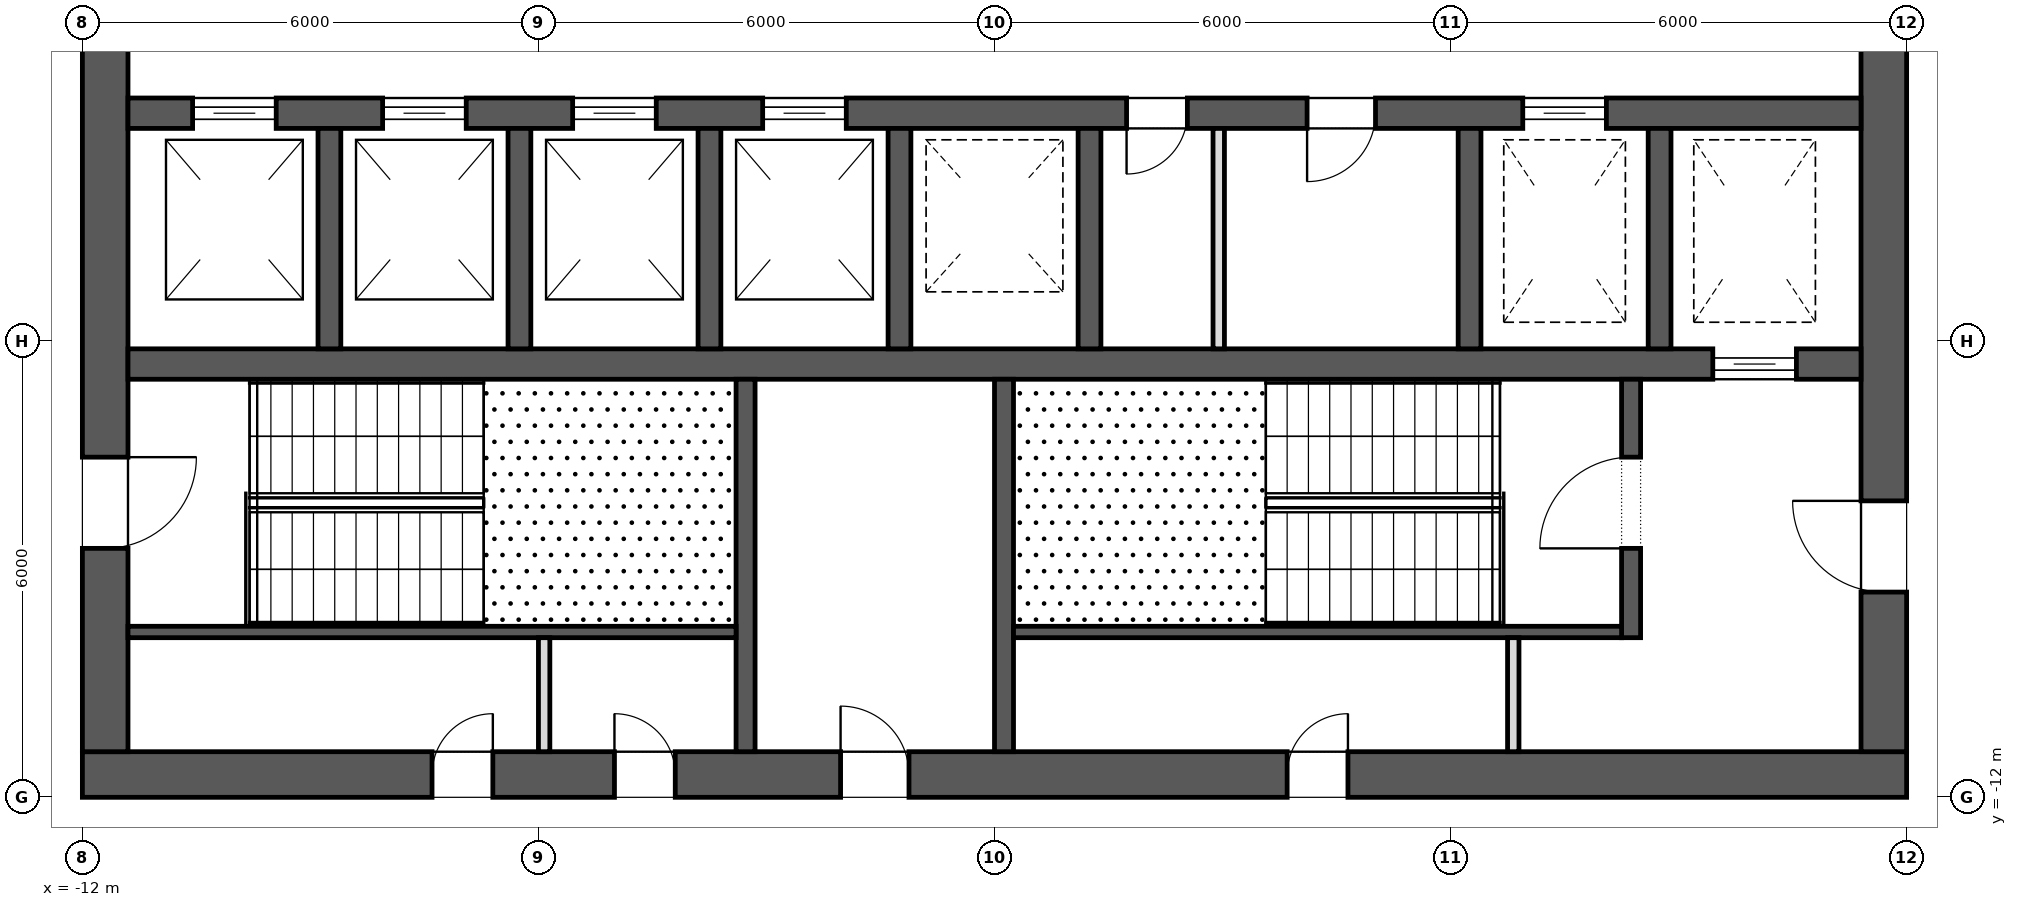
"""IFC4 building model, lengths in metres.
Left out: names, types, materials, properties, quantities, classifications, styles, units other than length and angle.
Written with IfcOpenShell. Run it as: python <this file> out.ifc"""

import sys

from ifc_helpers import new_model, si_unit, direction, frame, frame_2d, origin, place, context, subcontext, project, spatial, rectangle, extrude, element, fill, save


model = new_model("IFC4")
c1 = context("Model", 3, precision=1e-05, world=origin(), true_north=direction((0.0, 1.0)))
c2 = subcontext(c1, "Body", "Model", "MODEL_VIEW")
j1 = project(units=[si_unit("LENGTHUNIT", "METRE"), si_unit("PLANEANGLEUNIT", "RADIAN")], contexts=[c1])
p1 = place(None, origin())
s1 = spatial("IfcSite", under=j1, at=p1, CompositionType="ELEMENT")
p2 = place(p1, origin())
s2 = spatial("IfcBuilding", under=s1, at=p2, CompositionType="ELEMENT")
p3 = place(p2, frame((0.0, 0.0, 238.9)))
s3 = spatial("IfcBuildingStorey", under=s2, at=p3, CompositionType="ELEMENT", Elevation=238.9)
p4 = place(p3, frame((-12.0, -11.7, 0.0), z_axis=(0.0, 0.0, 1.0), x_axis=(1.0, 0.0, 0.0)))
e1 = element("IfcWall", 1, at=p4, inside=s3, PredefinedType="SHEAR", context=c2, shape_type="SweptSolid", body=[
    extrude(rectangle(XDim=24.0, YDim=0.6, at=frame_2d((12.0, 0.0))), origin(), (0.0, 0.0, 1.0), 4.0),
])
p5 = place(p4, frame((9.975, 0.0, 0.0)))
e2 = element("IfcOpeningElement", 2, at=p5, cuts=e1, PredefinedType="OPENING", context=c2, shape_type="SweptSolid", body=[
    extrude(rectangle(XDim=0.9, YDim=2.1, at=frame_2d((0.45, 1.05))), frame((0.0, 0.312, 0.0), z_axis=(0.0, -1.0, 0.0), x_axis=(1.0, 0.0, 0.0)), (0.0, 0.0, 1.0), 0.624),
])
p6 = place(p4, frame((4.6, 0.0, 0.0)))
e3 = element("IfcOpeningElement", 3, at=p6, cuts=e1, PredefinedType="OPENING", context=c2, shape_type="SweptSolid", body=[
    extrude(rectangle(XDim=0.8, YDim=2.1, at=frame_2d((0.4, 1.05))), frame((0.0, 0.312, 0.0), z_axis=(0.0, -1.0, 0.0), x_axis=(1.0, 0.0, 0.0)), (0.0, 0.0, 1.0), 0.624),
])
p7 = place(p4, frame((7.0, 0.0, 0.0)))
e4 = element("IfcOpeningElement", 4, at=p7, cuts=e1, PredefinedType="OPENING", context=c2, shape_type="SweptSolid", body=[
    extrude(rectangle(XDim=0.8, YDim=2.1, at=frame_2d((0.4, 1.05))), frame((0.0, 0.312, 0.0), z_axis=(0.0, -1.0, 0.0), x_axis=(1.0, 0.0, 0.0)), (0.0, 0.0, 1.0), 0.624),
])
p8 = place(p4, frame((15.85, 0.0, 0.0)))
e5 = element("IfcOpeningElement", 5, at=p8, cuts=e1, PredefinedType="OPENING", context=c2, shape_type="SweptSolid", body=[
    extrude(rectangle(XDim=0.8, YDim=2.1, at=frame_2d((0.4, 1.05))), frame((0.0, 0.312, 0.0), z_axis=(0.0, -1.0, 0.0), x_axis=(1.0, 0.0, 0.0)), (0.0, 0.0, 1.0), 0.624),
])
p9 = place(p3, frame((11.7, -11.4, 0.0), z_axis=(0.0, 0.0, 1.0), x_axis=(0.0, 1.0, 0.0)))
e6 = element("IfcWall", 6, at=p9, inside=s3, PredefinedType="SHEAR", context=c2, shape_type="SweptSolid", body=[
    extrude(rectangle(XDim=22.8, YDim=0.6, at=frame_2d((11.4, 0.0))), origin(), (0.0, 0.0, 1.0), 4.0),
])
p10 = place(p9, frame((10.2, 0.0, 0.0)))
e7 = element("IfcOpeningElement", 7, at=p10, cuts=e6, PredefinedType="OPENING", context=c2, shape_type="SweptSolid", body=[
    extrude(rectangle(XDim=2.4, YDim=2.1, at=frame_2d((1.2, 1.05))), frame((0.0, 0.312, 0.0), z_axis=(0.0, -1.0, 0.0), x_axis=(1.0, 0.0, 0.0)), (0.0, 0.0, 1.0), 0.624),
])
p11 = place(p9, frame((19.5, 0.0, 0.0)))
e8 = element("IfcOpeningElement", 8, at=p11, cuts=e6, PredefinedType="OPENING", context=c2, shape_type="SweptSolid", body=[
    extrude(rectangle(XDim=1.2, YDim=2.1, at=frame_2d((0.6, 1.05))), frame((0.0, 0.312, 0.0), z_axis=(0.0, -1.0, 0.0), x_axis=(1.0, 0.0, 0.0)), (0.0, 0.0, 1.0), 0.624),
])
p12 = place(p9, frame((2.1, 0.0, 0.0)))
e9 = element("IfcOpeningElement", 9, at=p12, cuts=e6, PredefinedType="OPENING", context=c2, shape_type="SweptSolid", body=[
    extrude(rectangle(XDim=1.2, YDim=2.1, at=frame_2d((0.6, 1.05))), frame((0.0, 0.312, 0.0), z_axis=(0.0, -1.0, 0.0), x_axis=(1.0, 0.0, 0.0)), (0.0, 0.0, 1.0), 0.624),
])
p13 = place(p3, frame((-11.7, -11.4, 0.0), z_axis=(0.0, 0.0, 1.0), x_axis=(0.0, 1.0, 0.0)))
e10 = element("IfcWall", 10, at=p13, inside=s3, PredefinedType="SHEAR", context=c2, shape_type="SweptSolid", body=[
    extrude(rectangle(XDim=22.8, YDim=0.6, at=frame_2d((11.4, 0.0))), origin(), (0.0, 0.0, 1.0), 4.0),
])
p14 = place(p13, frame((10.2, 0.0, 0.0)))
e11 = element("IfcOpeningElement", 11, at=p14, cuts=e10, PredefinedType="OPENING", context=c2, shape_type="SweptSolid", body=[
    extrude(rectangle(XDim=2.4, YDim=2.1, at=frame_2d((1.2, 1.05))), frame((0.0, 0.312, 0.0), z_axis=(0.0, -1.0, 0.0), x_axis=(1.0, 0.0, 0.0)), (0.0, 0.0, 1.0), 0.624),
])
p15 = place(p13, frame((18.925, 0.0, 0.0)))
e12 = element("IfcOpeningElement", 12, at=p15, cuts=e10, PredefinedType="OPENING", context=c2, shape_type="SweptSolid", body=[
    extrude(rectangle(XDim=1.2, YDim=2.1, at=frame_2d((0.6, 1.05))), frame((0.0, 0.312, 0.0), z_axis=(0.0, -1.0, 0.0), x_axis=(1.0, 0.0, 0.0)), (0.0, 0.0, 1.0), 0.624),
])
p16 = place(p13, frame((2.675, 0.0, 0.0)))
e13 = element("IfcOpeningElement", 13, at=p16, cuts=e10, PredefinedType="OPENING", context=c2, shape_type="SweptSolid", body=[
    extrude(rectangle(XDim=1.2, YDim=2.1, at=frame_2d((0.6, 1.05))), frame((0.0, 0.312, 0.0), z_axis=(0.0, -1.0, 0.0), x_axis=(1.0, 0.0, 0.0)), (0.0, 0.0, 1.0), 0.624),
])
p17 = place(p3, frame((-11.4, -3.0, 0.0), z_axis=(0.0, 0.0, 1.0), x_axis=(1.0, 0.0, 0.0)))
e14 = element("IfcWall", 14, at=p17, inside=s3, PredefinedType="SHEAR", context=c2, shape_type="SweptSolid", body=[
    extrude(rectangle(XDim=22.8, YDim=0.4, at=frame_2d((11.4, 0.0))), origin(), (0.0, 0.0, 1.0), 4.0),
])
p18 = place(p17, frame((0.85, 0.0, 0.0)))
e15 = element("IfcOpeningElement", 15, at=p18, cuts=e14, PredefinedType="OPENING", context=c2, shape_type="SweptSolid", body=[
    extrude(rectangle(XDim=1.1, YDim=2.1, at=frame_2d((0.55, 1.05))), frame((0.0, 0.212, 0.0), z_axis=(0.0, -1.0, 0.0), x_axis=(1.0, 0.0, 0.0)), (0.0, 0.0, 1.0), 0.424),
])
p19 = place(p17, frame((3.35, 0.0, 0.0)))
e16 = element("IfcOpeningElement", 16, at=p19, cuts=e14, PredefinedType="OPENING", context=c2, shape_type="SweptSolid", body=[
    extrude(rectangle(XDim=1.1, YDim=2.1, at=frame_2d((0.55, 1.05))), frame((0.0, 0.212, 0.0), z_axis=(0.0, -1.0, 0.0), x_axis=(1.0, 0.0, 0.0)), (0.0, 0.0, 1.0), 0.424),
])
p20 = place(p17, frame((5.85, 0.0, 0.0)))
e17 = element("IfcOpeningElement", 17, at=p20, cuts=e14, PredefinedType="OPENING", context=c2, shape_type="SweptSolid", body=[
    extrude(rectangle(XDim=1.1, YDim=2.1, at=frame_2d((0.55, 1.05))), frame((0.0, 0.212, 0.0), z_axis=(0.0, -1.0, 0.0), x_axis=(1.0, 0.0, 0.0)), (0.0, 0.0, 1.0), 0.424),
])
p21 = place(p17, frame((8.35, 0.0, 0.0)))
e18 = element("IfcOpeningElement", 18, at=p21, cuts=e14, PredefinedType="OPENING", context=c2, shape_type="SweptSolid", body=[
    extrude(rectangle(XDim=1.1, YDim=2.1, at=frame_2d((0.55, 1.05))), frame((0.0, 0.212, 0.0), z_axis=(0.0, -1.0, 0.0), x_axis=(1.0, 0.0, 0.0)), (0.0, 0.0, 1.0), 0.424),
])
p22 = place(p17, frame((18.35, 0.0, 0.0)))
e19 = element("IfcOpeningElement", 19, at=p22, cuts=e14, PredefinedType="OPENING", context=c2, shape_type="SweptSolid", body=[
    extrude(rectangle(XDim=1.1, YDim=2.1, at=frame_2d((0.55, 1.05))), frame((0.0, 0.212, 0.0), z_axis=(0.0, -1.0, 0.0), x_axis=(1.0, 0.0, 0.0)), (0.0, 0.0, 1.0), 0.424),
])
p23 = place(p17, frame((13.137, 0.0, 0.0)))
e20 = element("IfcOpeningElement", 20, at=p23, cuts=e14, PredefinedType="OPENING", context=c2, shape_type="SweptSolid", body=[
    extrude(rectangle(XDim=0.8, YDim=2.1, at=frame_2d((0.4, 1.05))), frame((0.0, 0.212, 0.0), z_axis=(0.0, -1.0, 0.0), x_axis=(1.0, 0.0, 0.0)), (0.0, 0.0, 1.0), 0.424),
])
p24 = place(p17, frame((15.512, 0.0, 0.0)))
e21 = element("IfcOpeningElement", 21, at=p24, cuts=e14, PredefinedType="OPENING", context=c2, shape_type="SweptSolid", body=[
    extrude(rectangle(XDim=0.9, YDim=2.1, at=frame_2d((0.45, 1.05))), frame((0.0, 0.212, 0.0), z_axis=(0.0, -1.0, 0.0), x_axis=(1.0, 0.0, 0.0)), (0.0, 0.0, 1.0), 0.424),
])
p25 = place(p3, frame((-11.4, -6.3, 0.0), z_axis=(0.0, 0.0, 1.0), x_axis=(1.0, 0.0, 0.0)))
e22 = element("IfcWall", 22, at=p25, inside=s3, PredefinedType="SHEAR", context=c2, shape_type="SweptSolid", body=[
    extrude(rectangle(XDim=22.8, YDim=0.4, at=frame_2d((11.4, 0.0))), origin(), (0.0, 0.0, 1.0), 4.0),
])
p26 = place(p25, frame((20.85, 0.0, 0.0)))
e23 = element("IfcOpeningElement", 23, at=p26, cuts=e22, PredefinedType="OPENING", context=c2, shape_type="SweptSolid", body=[
    extrude(rectangle(XDim=1.1, YDim=2.1, at=frame_2d((0.55, 1.05))), frame((0.0, 0.212, 0.0), z_axis=(0.0, -1.0, 0.0), x_axis=(1.0, 0.0, 0.0)), (0.0, 0.0, 1.0), 0.424),
])
for number, where, z_axis, x_axis in (
    (24, (-8.75, -6.1, 0.0), (0.0, 0.0, 1.0), (0.0, 1.0, 0.0)),
    (25, (-6.25, -6.1, 0.0), (0.0, 0.0, 1.0), (0.0, 1.0, 0.0)),
    (26, (-3.75, -6.1, 0.0), (0.0, 0.0, 1.0), (0.0, 1.0, 0.0)),
    (27, (-1.25, -6.1, 0.0), (0.0, 0.0, 1.0), (0.0, 1.0, 0.0)),
    (28, (1.25, -6.1, 0.0), (0.0, 0.0, 1.0), (0.0, 1.0, 0.0)),
    (29, (6.25, -6.1, 0.0), (0.0, 0.0, 1.0), (0.0, 1.0, 0.0)),
    (30, (8.75, -6.1, 0.0), (0.0, 0.0, 1.0), (0.0, 1.0, 0.0)),
):
    element("IfcWall", number, at=place(p3, frame(where, z_axis=z_axis, x_axis=x_axis)), inside=s3, PredefinedType="SHEAR", context=c2, shape_type="SweptSolid", body=[
        extrude(rectangle(XDim=2.9, YDim=0.3, at=frame_2d((1.45, 0.0))), origin(), (0.0, 0.0, 1.0), 4.0),
    ])
for number, where, z_axis, x_axis in (
    (31, (-3.275, -11.4, 0.0), (0.0, 0.0, 1.0), (0.0, 1.0, 0.0)),
    (32, (0.125, -11.4, 0.0), (0.0, 0.0, 1.0), (0.0, 1.0, 0.0)),
):
    element("IfcWall", number, at=place(p3, frame(where, z_axis=z_axis, x_axis=x_axis)), inside=s3, PredefinedType="SHEAR", context=c2, shape_type="SweptSolid", body=[
        extrude(rectangle(XDim=4.9, YDim=0.25, at=frame_2d((2.45, 0.0))), origin(), (0.0, 0.0, 1.0), 3.7),
    ])
p27 = place(p3, frame((8.375, -9.9, 0.0), z_axis=(0.0, 0.0, 1.0), x_axis=(0.0, 1.0, 0.0)))
e33 = element("IfcWall", 33, at=p27, inside=s3, PredefinedType="SHEAR", context=c2, shape_type="SweptSolid", body=[
    extrude(rectangle(XDim=3.4, YDim=0.25, at=frame_2d((1.7, 0.0))), origin(), (0.0, 0.0, 1.0), 3.7),
])
p28 = place(p27, frame((1.175, 0.0, 0.0)))
e34 = element("IfcOpeningElement", 34, at=p28, cuts=e33, PredefinedType="OPENING", context=c2, shape_type="SweptSolid", body=[
    extrude(rectangle(XDim=1.2, YDim=2.1, at=frame_2d((0.6, 1.05))), frame((0.0, 0.137, 0.0), z_axis=(0.0, -1.0, 0.0), x_axis=(1.0, 0.0, 0.0)), (0.0, 0.0, 1.0), 0.274),
])
for number, where, z_axis, x_axis in (
    (35, (-11.4, -9.825, 0.0), (0.0, 0.0, 1.0), (1.0, 0.0, 0.0)),
    (36, (0.25, -9.825, 0.0), (0.0, 0.0, 1.0), (1.0, 0.0, 0.0)),
):
    element("IfcWall", number, at=place(p3, frame(where, z_axis=z_axis, x_axis=x_axis)), inside=s3, PredefinedType="SHEAR", context=c2, shape_type="SweptSolid", body=[
        extrude(rectangle(XDim=8.0, YDim=0.15, at=frame_2d((4.0, 0.0))), origin(), (0.0, 0.0, 1.0), 3.7),
    ])
for number, where, z_axis, x_axis in (
    (37, (-5.925, -11.4, 0.0), (0.0, 0.0, 1.0), (0.0, 1.0, 0.0)),
    (38, (6.825, -11.4, 0.0), (0.0, 0.0, 1.0), (0.0, 1.0, 0.0)),
):
    element("IfcWall", number, at=place(p3, frame(where, z_axis=z_axis, x_axis=x_axis)), inside=s3, PredefinedType="PARTITIONING", context=c2, shape_type="SweptSolid", body=[
        extrude(rectangle(XDim=1.5, YDim=0.15, at=frame_2d((0.75, 0.0))), origin(), (0.0, 0.0, 1.0), 3.7),
    ])
p29 = place(p3, frame((2.95, -6.1, 0.0), z_axis=(0.0, 0.0, 1.0), x_axis=(0.0, 1.0, 0.0)))
e39 = element("IfcWall", 39, at=p29, inside=s3, PredefinedType="PARTITIONING", context=c2, shape_type="SweptSolid", body=[
    extrude(rectangle(XDim=2.9, YDim=0.15, at=frame_2d((1.45, 0.0))), origin(), (0.0, 0.0, 1.0), 3.7),
])
p30 = place(p26, origin())
e40 = element("IfcDoor", 40, at=p30, inside=s3, OperationType="SLIDING_TO_LEFT", PredefinedType="DOOR", context=c2, shape_type="SweptSolid", body=[
    extrude(rectangle(XDim=1.1, YDim=2.1, at=frame_2d((0.55, 1.05))), frame((0.0, 0.025, 0.0), z_axis=(0.0, -1.0, 0.0), x_axis=(1.0, 0.0, 0.0)), (0.0, 0.0, 1.0), 0.05),
])
fill(e23, e40)
p31 = place(p18, origin())
e41 = element("IfcDoor", 41, at=p31, inside=s3, OperationType="SLIDING_TO_LEFT", PredefinedType="DOOR", context=c2, shape_type="SweptSolid", body=[
    extrude(rectangle(XDim=1.1, YDim=2.1, at=frame_2d((0.55, 1.05))), frame((0.0, 0.025, 0.0), z_axis=(0.0, -1.0, 0.0), x_axis=(1.0, 0.0, 0.0)), (0.0, 0.0, 1.0), 0.05),
])
fill(e15, e41)
p32 = place(p19, origin())
e42 = element("IfcDoor", 42, at=p32, inside=s3, OperationType="SLIDING_TO_LEFT", PredefinedType="DOOR", context=c2, shape_type="SweptSolid", body=[
    extrude(rectangle(XDim=1.1, YDim=2.1, at=frame_2d((0.55, 1.05))), frame((0.0, 0.025, 0.0), z_axis=(0.0, -1.0, 0.0), x_axis=(1.0, 0.0, 0.0)), (0.0, 0.0, 1.0), 0.05),
])
fill(e16, e42)
p33 = place(p20, origin())
e43 = element("IfcDoor", 43, at=p33, inside=s3, OperationType="SLIDING_TO_LEFT", PredefinedType="DOOR", context=c2, shape_type="SweptSolid", body=[
    extrude(rectangle(XDim=1.1, YDim=2.1, at=frame_2d((0.55, 1.05))), frame((0.0, 0.025, 0.0), z_axis=(0.0, -1.0, 0.0), x_axis=(1.0, 0.0, 0.0)), (0.0, 0.0, 1.0), 0.05),
])
fill(e17, e43)
p34 = place(p21, origin())
e44 = element("IfcDoor", 44, at=p34, inside=s3, OperationType="SLIDING_TO_LEFT", PredefinedType="DOOR", context=c2, shape_type="SweptSolid", body=[
    extrude(rectangle(XDim=1.1, YDim=2.1, at=frame_2d((0.55, 1.05))), frame((0.0, 0.025, 0.0), z_axis=(0.0, -1.0, 0.0), x_axis=(1.0, 0.0, 0.0)), (0.0, 0.0, 1.0), 0.05),
])
fill(e18, e44)
p35 = place(p22, origin())
e45 = element("IfcDoor", 45, at=p35, inside=s3, OperationType="SLIDING_TO_LEFT", PredefinedType="DOOR", context=c2, shape_type="SweptSolid", body=[
    extrude(rectangle(XDim=1.1, YDim=2.1, at=frame_2d((0.55, 1.05))), frame((0.0, 0.025, 0.0), z_axis=(0.0, -1.0, 0.0), x_axis=(1.0, 0.0, 0.0)), (0.0, 0.0, 1.0), 0.05),
])
fill(e19, e45)
p36 = place(p16, frame((1.2, 0.0, 0.0), z_axis=(0.0, 0.0, 1.0), x_axis=(-1.0, 0.0, 0.0)))
e46 = element("IfcDoor", 46, at=p36, inside=s3, OperationType="SINGLE_SWING_RIGHT", PredefinedType="DOOR", context=c2, shape_type="SweptSolid", body=[
    extrude(rectangle(XDim=1.2, YDim=2.1, at=frame_2d((0.6, 1.05))), frame((0.0, 0.025, 0.0), z_axis=(0.0, -1.0, 0.0), x_axis=(1.0, 0.0, 0.0)), (0.0, 0.0, 1.0), 0.05),
])
fill(e13, e46)
p37 = place(p28, origin())
e47 = element("IfcDoor", 47, at=p37, inside=s3, OperationType="SINGLE_SWING_RIGHT", PredefinedType="DOOR", context=c2, shape_type="SweptSolid", body=[
    extrude(rectangle(XDim=1.2, YDim=2.1, at=frame_2d((0.6, 1.05))), frame((0.0, 0.025, 0.0), z_axis=(0.0, -1.0, 0.0), x_axis=(1.0, 0.0, 0.0)), (0.0, 0.0, 1.0), 0.05),
])
fill(e34, e47)
p38 = place(p12, origin())
e48 = element("IfcDoor", 48, at=p38, inside=s3, OperationType="SINGLE_SWING_LEFT", PredefinedType="DOOR", context=c2, shape_type="SweptSolid", body=[
    extrude(rectangle(XDim=1.2, YDim=2.1, at=frame_2d((0.6, 1.05))), frame((0.0, 0.025, 0.0), z_axis=(0.0, -1.0, 0.0), x_axis=(1.0, 0.0, 0.0)), (0.0, 0.0, 1.0), 0.05),
])
fill(e9, e48)
p39 = place(p5, origin())
e49 = element("IfcDoor", 49, at=p39, inside=s3, OperationType="SINGLE_SWING_RIGHT", PredefinedType="DOOR", context=c2, shape_type="SweptSolid", body=[
    extrude(rectangle(XDim=0.9, YDim=2.1, at=frame_2d((0.45, 1.05))), frame((0.0, 0.025, 0.0), z_axis=(0.0, -1.0, 0.0), x_axis=(1.0, 0.0, 0.0)), (0.0, 0.0, 1.0), 0.05),
])
fill(e2, e49)
p40 = place(p6, origin())
e50 = element("IfcDoor", 50, at=p40, inside=s3, OperationType="SINGLE_SWING_LEFT", PredefinedType="DOOR", context=c2, shape_type="SweptSolid", body=[
    extrude(rectangle(XDim=0.8, YDim=2.1, at=frame_2d((0.4, 1.05))), frame((0.0, 0.025, 0.0), z_axis=(0.0, -1.0, 0.0), x_axis=(1.0, 0.0, 0.0)), (0.0, 0.0, 1.0), 0.05),
])
fill(e3, e50)
p41 = place(p7, origin())
e51 = element("IfcDoor", 51, at=p41, inside=s3, OperationType="SINGLE_SWING_RIGHT", PredefinedType="DOOR", context=c2, shape_type="SweptSolid", body=[
    extrude(rectangle(XDim=0.8, YDim=2.1, at=frame_2d((0.4, 1.05))), frame((0.0, 0.025, 0.0), z_axis=(0.0, -1.0, 0.0), x_axis=(1.0, 0.0, 0.0)), (0.0, 0.0, 1.0), 0.05),
])
fill(e4, e51)
p42 = place(p8, origin())
e52 = element("IfcDoor", 52, at=p42, inside=s3, OperationType="SINGLE_SWING_LEFT", PredefinedType="DOOR", context=c2, shape_type="SweptSolid", body=[
    extrude(rectangle(XDim=0.8, YDim=2.1, at=frame_2d((0.4, 1.05))), frame((0.0, 0.025, 0.0), z_axis=(0.0, -1.0, 0.0), x_axis=(1.0, 0.0, 0.0)), (0.0, 0.0, 1.0), 0.05),
])
fill(e5, e52)
p43 = place(p23, frame((0.8, 0.0, 0.0), z_axis=(0.0, 0.0, 1.0), x_axis=(-1.0, 0.0, 0.0)))
e53 = element("IfcDoor", 53, at=p43, inside=s3, OperationType="SINGLE_SWING_LEFT", PredefinedType="DOOR", context=c2, shape_type="SweptSolid", body=[
    extrude(rectangle(XDim=0.8, YDim=2.1, at=frame_2d((0.4, 1.05))), frame((0.0, 0.025, 0.0), z_axis=(0.0, -1.0, 0.0), x_axis=(1.0, 0.0, 0.0)), (0.0, 0.0, 1.0), 0.05),
])
fill(e20, e53)
p44 = place(p24, frame((0.9, 0.0, 0.0), z_axis=(0.0, 0.0, 1.0), x_axis=(-1.0, 0.0, 0.0)))
e54 = element("IfcDoor", 54, at=p44, inside=s3, OperationType="SINGLE_SWING_LEFT", PredefinedType="DOOR", context=c2, shape_type="SweptSolid", body=[
    extrude(rectangle(XDim=0.9, YDim=2.1, at=frame_2d((0.45, 1.05))), frame((0.0, 0.025, 0.0), z_axis=(0.0, -1.0, 0.0), x_axis=(1.0, 0.0, 0.0)), (0.0, 0.0, 1.0), 0.05),
])
fill(e21, e54)
save(model, sys.argv[1])
